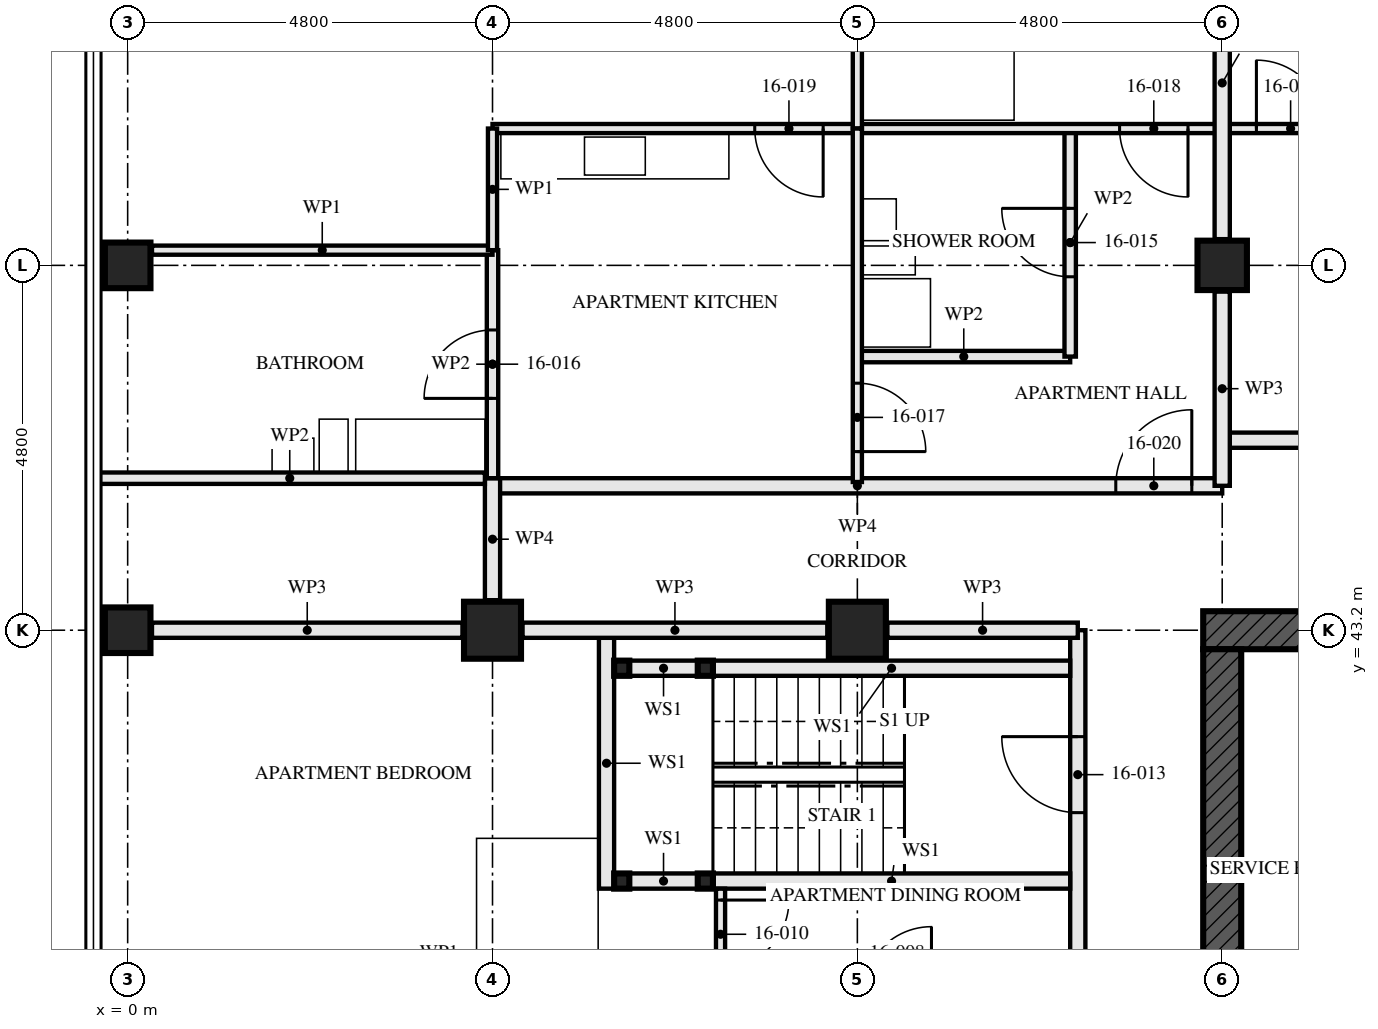
"""IFC4 building model, lengths in metres.
Left out: names, types, materials, properties, quantities, classifications, styles, units other than length and angle.
Written with IfcOpenShell. Run it as: python <this file> out.ifc"""

import sys

from ifc_helpers import new_model, si_unit, direction, frame, frame_2d, origin, origin_2d, place, context, subcontext, project, spatial, rectangle, hollow_rectangle, extrude, element, fill, save


model = new_model("IFC4")
c1 = context("Model", 3, precision=1e-05, world=origin(), true_north=direction((0.0, 1.0)))
c2 = subcontext(c1, "Body", "Model", "MODEL_VIEW")
j1 = project(units=[si_unit("LENGTHUNIT", "METRE"), si_unit("PLANEANGLEUNIT", "RADIAN")], contexts=[c1])
p1 = place(None, origin())
s1 = spatial("IfcSite", under=j1, at=p1, CompositionType="ELEMENT")
p2 = place(p1, origin())
s2 = spatial("IfcBuilding", under=s1, at=p2, CompositionType="ELEMENT")
p3 = place(p2, frame((0.0, 0.0, 62.0)))
s3 = spatial("IfcBuildingStorey", under=s2, at=p3, CompositionType="ELEMENT", Elevation=62.0)
for number, where, z_axis, x_axis in (
    (1, (0.0, 43.2, 0.0), (0.0, 0.0, 1.0), (0.0, 1.0, 0.0)),
    (2, (0.0, 48.0, 0.0), (0.0, 0.0, 1.0), (1.0, 0.0, 0.0)),
):
    element("IfcColumn", number, at=place(p3, frame(where, z_axis=z_axis, x_axis=x_axis)), inside=s3, PredefinedType="COLUMN", context=c2, shape_type="SweptSolid", body=[
        extrude(hollow_rectangle(XDim=0.6, YDim=0.6, WallThickness=0.08, at=origin_2d()), origin(), (0.0, 0.0, 1.0), 3.5),
    ])
for number, where, z_axis, x_axis in (
    (3, (4.8, 43.2, 0.0), (0.0, 0.0, 1.0), (0.0, 1.0, 0.0)),
    (4, (9.6, 43.2, 0.0), (0.0, 0.0, 1.0), (0.0, 1.0, 0.0)),
):
    element("IfcColumn", number, at=place(p3, frame(where, z_axis=z_axis, x_axis=x_axis)), inside=s3, PredefinedType="COLUMN", context=c2, shape_type="SweptSolid", body=[
        extrude(hollow_rectangle(XDim=0.75, YDim=0.75, WallThickness=0.08, at=origin_2d()), origin(), (0.0, 0.0, 1.0), 3.5),
    ])
p4 = place(p3, frame((14.4, 48.0, 0.0), z_axis=(0.0, 0.0, 1.0), x_axis=(1.0, 0.0, 0.0)))
e5 = element("IfcColumn", 5, at=p4, inside=s3, PredefinedType="COLUMN", context=c2, shape_type="SweptSolid", body=[
    extrude(hollow_rectangle(XDim=0.65, YDim=0.65, WallThickness=0.05, at=origin_2d()), origin(), (0.0, 0.0, 1.0), 3.5),
])
p5 = place(p3, frame((29.05, 43.2, -0.17), z_axis=(0.0, 0.0, 1.0), x_axis=(-1.0, 0.0, 0.0)))
e6 = element("IfcWall", 6, at=p5, inside=s3, PredefinedType="SHEAR", context=c2, shape_type="SweptSolid", body=[
    extrude(rectangle(XDim=14.9, YDim=0.5, at=frame_2d((7.45, 0.0))), origin(), (0.0, 0.0, 1.0), 3.5),
])
p6 = place(p5, frame((6.85, 0.0, 0.17)))
e7 = element("IfcOpeningElement", 7, at=p6, cuts=e6, PredefinedType="OPENING", context=c2, shape_type="SweptSolid", body=[
    extrude(rectangle(XDim=1.2, YDim=2.1, at=frame_2d((0.6, 1.05))), frame((0.0, 0.26, 0.0), z_axis=(0.0, -1.0, 0.0), x_axis=(1.0, 0.0, 0.0)), (0.0, 0.0, 1.0), 0.521),
])
p7 = place(p3, frame((14.4, 42.95, -0.17), z_axis=(0.0, 0.0, 1.0), x_axis=(0.0, -1.0, 0.0)))
e8 = element("IfcWall", 8, at=p7, inside=s3, PredefinedType="SHEAR", context=c2, shape_type="SweptSolid", body=[
    extrude(rectangle(XDim=13.9, YDim=0.5, at=frame_2d((6.95, 0.0))), origin(), (0.0, 0.0, 1.0), 3.5),
])
p8 = place(p7, frame((6.35, 0.0, 0.17)))
e9 = element("IfcOpeningElement", 9, at=p8, cuts=e8, PredefinedType="OPENING", context=c2, shape_type="SweptSolid", body=[
    extrude(rectangle(XDim=1.2, YDim=2.1, at=frame_2d((0.6, 1.05))), frame((0.0, 0.26, 0.0), z_axis=(0.0, -1.0, 0.0), x_axis=(1.0, 0.0, 0.0)), (0.0, 0.0, 1.0), 0.521),
])
for number, where, z_axis, x_axis in (
    (10, (6.5, 42.7, 0.0), (0.0, 0.0, 1.0), (1.0, 0.0, 0.0)),
    (11, (6.5, 39.9, 0.0), (0.0, 0.0, 1.0), (1.0, 0.0, 0.0)),
    (12, (7.6, 42.7, 0.0), (0.0, 0.0, 1.0), (1.0, 0.0, 0.0)),
    (13, (7.6, 39.9, 0.0), (0.0, 0.0, 1.0), (1.0, 0.0, 0.0)),
):
    element("IfcColumn", number, at=place(p3, frame(where, z_axis=z_axis, x_axis=x_axis)), inside=s3, PredefinedType="COLUMN", context=c2, shape_type="SweptSolid", body=[
        extrude(hollow_rectangle(XDim=0.2, YDim=0.2, WallThickness=0.008, at=origin_2d()), origin(), (0.0, 0.0, 1.0), 3.33),
    ])
p9 = place(p3, frame((6.6, 42.7, 0.0), z_axis=(0.0, 0.0, 1.0), x_axis=(1.0, 0.0, 0.0)))
e14 = element("IfcWall", 14, at=p9, inside=s3, PredefinedType="SOLIDWALL", context=c2, shape_type="SweptSolid", body=[
    extrude(rectangle(XDim=0.9, YDim=0.2, at=frame_2d((0.45, 0.0))), origin(), (0.0, 0.0, 1.0), 2.99),
])
p10 = place(p3, frame((7.7, 42.7, 0.0), z_axis=(0.0, 0.0, 1.0), x_axis=(1.0, 0.0, 0.0)))
e15 = element("IfcWall", 15, at=p10, inside=s3, PredefinedType="SOLIDWALL", context=c2, shape_type="SweptSolid", body=[
    extrude(rectangle(XDim=4.7, YDim=0.2, at=frame_2d((2.35, 0.0))), origin(), (0.0, 0.0, 1.0), 2.99),
])
p11 = place(p3, frame((6.6, 39.9, 0.0), z_axis=(0.0, 0.0, 1.0), x_axis=(1.0, 0.0, 0.0)))
e16 = element("IfcWall", 16, at=p11, inside=s3, PredefinedType="SOLIDWALL", context=c2, shape_type="SweptSolid", body=[
    extrude(rectangle(XDim=0.9, YDim=0.2, at=frame_2d((0.45, 0.0))), origin(), (0.0, 0.0, 1.0), 2.99),
])
p12 = place(p3, frame((7.7, 39.9, 0.0), z_axis=(0.0, 0.0, 1.0), x_axis=(1.0, 0.0, 0.0)))
e17 = element("IfcWall", 17, at=p12, inside=s3, PredefinedType="SOLIDWALL", context=c2, shape_type="SweptSolid", body=[
    extrude(rectangle(XDim=4.7, YDim=0.2, at=frame_2d((2.35, 0.0))), origin(), (0.0, 0.0, 1.0), 2.99),
])
p13 = place(p3, frame((6.3, 43.1, 0.0), z_axis=(0.0, 0.0, 1.0), x_axis=(0.0, -1.0, 0.0)))
e18 = element("IfcWall", 18, at=p13, inside=s3, PredefinedType="SOLIDWALL", context=c2, shape_type="SweptSolid", body=[
    extrude(rectangle(XDim=3.3, YDim=0.2, at=frame_2d((1.65, 0.0))), origin(), (0.0, 0.0, 1.0), 3.33),
])
p14 = place(p3, frame((7.8, 39.8, 0.0), z_axis=(0.0, 0.0, 1.0), x_axis=(0.0, -1.0, 0.0)))
e19 = element("IfcWall", 19, at=p14, inside=s3, PredefinedType="PARTITIONING", context=c2, shape_type="SweptSolid", body=[
    extrude(rectangle(XDim=1.4, YDim=0.12, at=frame_2d((0.7, 0.0))), origin(), (0.0, 0.0, 1.0), 3.33),
])
p15 = place(p14, frame((0.15, 0.0, 0.0)))
e20 = element("IfcOpeningElement", 20, at=p15, cuts=e19, PredefinedType="OPENING", context=c2, shape_type="SweptSolid", body=[
    extrude(rectangle(XDim=0.9, YDim=2.1, at=frame_2d((0.45, 1.05))), frame((0.0, 0.071, 0.0), z_axis=(0.0, -1.0, 0.0), x_axis=(1.0, 0.0, 0.0)), (0.0, 0.0, 1.0), 0.141),
])
p16 = place(p3, frame((12.5, 43.2, 0.0), z_axis=(0.0, 0.0, 1.0), x_axis=(0.0, -1.0, 0.0)))
e21 = element("IfcWall", 21, at=p16, inside=s3, PredefinedType="PARTITIONING", context=c2, shape_type="SweptSolid", body=[
    extrude(rectangle(XDim=14.4, YDim=0.2, at=frame_2d((7.2, 0.0))), origin(), (0.0, 0.0, 1.0), 2.55),
])
p17 = place(p16, frame((1.4, 0.0, 0.0)))
e22 = element("IfcOpeningElement", 22, at=p17, cuts=e21, PredefinedType="OPENING", context=c2, shape_type="SweptSolid", body=[
    extrude(rectangle(XDim=1.0, YDim=2.1, at=frame_2d((0.5, 1.05))), frame((0.0, 0.111, 0.0), z_axis=(0.0, -1.0, 0.0), x_axis=(1.0, 0.0, 0.0)), (0.0, 0.0, 1.0), 0.221),
])
p18 = place(p16, frame((10.0, 0.0, 0.0)))
e23 = element("IfcOpeningElement", 23, at=p18, cuts=e21, PredefinedType="OPENING", context=c2, shape_type="SweptSolid", body=[
    extrude(rectangle(XDim=1.0, YDim=2.1, at=frame_2d((0.5, 1.05))), frame((0.0, 0.111, 0.0), z_axis=(0.0, -1.0, 0.0), x_axis=(1.0, 0.0, 0.0)), (0.0, 0.0, 1.0), 0.221),
])
p19 = place(p3, frame((12.4, 49.8, 0.0), z_axis=(0.0, 0.0, 1.0), x_axis=(0.0, -1.0, 0.0)))
e24 = element("IfcWall", 24, at=p19, inside=s3, PredefinedType="PARTITIONING", context=c2, shape_type="SweptSolid", body=[
    extrude(rectangle(XDim=3.0, YDim=0.15, at=frame_2d((1.5, 0.0))), origin(), (0.0, 0.0, 1.0), 2.55),
])
p20 = place(p19, frame((1.05, 0.0, 0.0)))
e25 = element("IfcOpeningElement", 25, at=p20, cuts=e24, PredefinedType="OPENING", context=c2, shape_type="SweptSolid", body=[
    extrude(rectangle(XDim=0.9, YDim=2.1, at=frame_2d((0.45, 1.05))), frame((0.0, 0.085, 0.0), z_axis=(0.0, -1.0, 0.0), x_axis=(1.0, 0.0, 0.0)), (0.0, 0.0, 1.0), 0.171),
])
p21 = place(p3, frame((12.4, 46.8, 0.0), z_axis=(0.0, 0.0, 1.0), x_axis=(-1.0, 0.0, 0.0)))
e26 = element("IfcWall", 26, at=p21, inside=s3, PredefinedType="PARTITIONING", context=c2, shape_type="SweptSolid", body=[
    extrude(rectangle(XDim=2.8, YDim=0.15, at=frame_2d((1.4, 0.0))), origin(), (0.0, 0.0, 1.0), 3.33),
])
p22 = place(p3, frame((4.8, 48.2, 0.0), z_axis=(0.0, 0.0, 1.0), x_axis=(0.0, -1.0, 0.0)))
e27 = element("IfcWall", 27, at=p22, inside=s3, PredefinedType="PARTITIONING", context=c2, shape_type="SweptSolid", body=[
    extrude(rectangle(XDim=3.0, YDim=0.15, at=frame_2d((1.5, 0.0))), origin(), (0.0, 0.0, 1.0), 2.55),
])
p23 = place(p22, frame((1.05, 0.0, 0.0)))
e28 = element("IfcOpeningElement", 28, at=p23, cuts=e27, PredefinedType="OPENING", context=c2, shape_type="SweptSolid", body=[
    extrude(rectangle(XDim=0.9, YDim=2.1, at=frame_2d((0.45, 1.05))), frame((0.0, 0.085, 0.0), z_axis=(0.0, -1.0, 0.0), x_axis=(1.0, 0.0, 0.0)), (0.0, 0.0, 1.0), 0.171),
])
p24 = place(p3, frame((9.6, 49.8, 0.0), z_axis=(0.0, 0.0, 1.0), x_axis=(0.0, -1.0, 0.0)))
e29 = element("IfcWall", 29, at=p24, inside=s3, PredefinedType="PARTITIONING", context=c2, shape_type="SweptSolid", body=[
    extrude(rectangle(XDim=4.65, YDim=0.12, at=frame_2d((2.325, 0.0))), origin(), (0.0, 0.0, 1.0), 2.55),
])
p25 = place(p24, frame((3.35, 0.0, 0.0)))
e30 = element("IfcOpeningElement", 30, at=p25, cuts=e29, PredefinedType="OPENING", context=c2, shape_type="SweptSolid", body=[
    extrude(rectangle(XDim=0.9, YDim=2.1, at=frame_2d((0.45, 1.05))), frame((0.0, 0.071, 0.0), z_axis=(0.0, -1.0, 0.0), x_axis=(1.0, 0.0, 0.0)), (0.0, 0.0, 1.0), 0.141),
])
p26 = place(p3, frame((14.4, 49.8, 0.0), z_axis=(0.0, 0.0, 1.0), x_axis=(-1.0, 0.0, 0.0)))
e31 = element("IfcWall", 31, at=p26, inside=s3, PredefinedType="PARTITIONING", context=c2, shape_type="SweptSolid", body=[
    extrude(rectangle(XDim=4.8, YDim=0.12, at=frame_2d((2.4, 0.0))), origin(), (0.0, 0.0, 1.0), 3.33),
])
p27 = place(p26, frame((0.45, 0.0, 0.0)))
e32 = element("IfcOpeningElement", 32, at=p27, cuts=e31, PredefinedType="OPENING", context=c2, shape_type="SweptSolid", body=[
    extrude(rectangle(XDim=0.9, YDim=2.1, at=frame_2d((0.45, 1.05))), frame((0.0, 0.071, 0.0), z_axis=(0.0, -1.0, 0.0), x_axis=(1.0, 0.0, 0.0)), (0.0, 0.0, 1.0), 0.141),
])
p28 = place(p3, frame((9.6, 49.8, 0.0), z_axis=(0.0, 0.0, 1.0), x_axis=(-1.0, 0.0, 0.0)))
e33 = element("IfcWall", 33, at=p28, inside=s3, PredefinedType="PARTITIONING", context=c2, shape_type="SweptSolid", body=[
    extrude(rectangle(XDim=4.8, YDim=0.12, at=frame_2d((2.4, 0.0))), origin(), (0.0, 0.0, 1.0), 3.33),
])
p29 = place(p28, frame((0.45, 0.0, 0.0)))
e34 = element("IfcOpeningElement", 34, at=p29, cuts=e33, PredefinedType="OPENING", context=c2, shape_type="SweptSolid", body=[
    extrude(rectangle(XDim=0.9, YDim=2.1, at=frame_2d((0.45, 1.05))), frame((0.0, 0.071, 0.0), z_axis=(0.0, -1.0, 0.0), x_axis=(1.0, 0.0, 0.0)), (0.0, 0.0, 1.0), 0.141),
])
p30 = place(p3, frame((4.8, 48.2, 0.0), z_axis=(0.0, 0.0, 1.0), x_axis=(-1.0, 0.0, 0.0)))
e35 = element("IfcWall", 35, at=p30, inside=s3, PredefinedType="PARTITIONING", context=c2, shape_type="SweptSolid", body=[
    extrude(rectangle(XDim=4.48, YDim=0.12, at=frame_2d((2.24, 0.0))), origin(), (0.0, 0.0, 1.0), 3.33),
])
p31 = place(p3, frame((9.6, 57.28, 0.0), z_axis=(0.0, 0.0, 1.0), x_axis=(0.0, -1.0, 0.0)))
e36 = element("IfcWall", 36, at=p31, inside=s3, PredefinedType="PARTITIONING", context=c2, shape_type="SweptSolid", body=[
    extrude(rectangle(XDim=7.48, YDim=0.12, at=frame_2d((3.74, 0.0))), origin(), (0.0, 0.0, 1.0), 2.55),
])
p32 = place(p3, frame((4.8, 49.8, 0.0), z_axis=(0.0, 0.0, 1.0), x_axis=(0.0, -1.0, 0.0)))
e37 = element("IfcWall", 37, at=p32, inside=s3, PredefinedType="PARTITIONING", context=c2, shape_type="SweptSolid", body=[
    extrude(rectangle(XDim=1.6, YDim=0.12, at=frame_2d((0.8, 0.0))), origin(), (0.0, 0.0, 1.0), 3.33),
])
p33 = place(p3, frame((14.4, 45.1, 0.0), z_axis=(0.0, 0.0, 1.0), x_axis=(-1.0, 0.0, 0.0)))
e38 = element("IfcWall", 38, at=p33, inside=s3, PredefinedType="PARTITIONING", context=c2, shape_type="SweptSolid", body=[
    extrude(rectangle(XDim=9.6, YDim=0.2, at=frame_2d((4.8, 0.0))), origin(), (0.0, 0.0, 1.0), 3.33),
])
p34 = place(p33, frame((0.4, 0.0, 0.0)))
e39 = element("IfcOpeningElement", 39, at=p34, cuts=e38, PredefinedType="OPENING", context=c2, shape_type="SweptSolid", body=[
    extrude(rectangle(XDim=1.0, YDim=2.1, at=frame_2d((0.5, 1.05))), frame((0.0, 0.111, 0.0), z_axis=(0.0, -1.0, 0.0), x_axis=(1.0, 0.0, 0.0)), (0.0, 0.0, 1.0), 0.221),
])
p35 = place(p3, frame((4.8, 45.2, 0.0), z_axis=(0.0, 0.0, 1.0), x_axis=(0.0, -1.0, 0.0)))
e40 = element("IfcWall", 40, at=p35, inside=s3, PredefinedType="PARTITIONING", context=c2, shape_type="SweptSolid", body=[
    extrude(rectangle(XDim=1.605, YDim=0.2, at=frame_2d((0.802, 0.0))), origin(), (0.0, 0.0, 1.0), 3.33),
])
p36 = place(p3, frame((19.2, 49.8, 0.0), z_axis=(0.0, 0.0, 1.0), x_axis=(-1.0, 0.0, 0.0)))
e41 = element("IfcWall", 41, at=p36, inside=s3, PredefinedType="PARTITIONING", context=c2, shape_type="SweptSolid", body=[
    extrude(rectangle(XDim=4.8, YDim=0.12, at=frame_2d((2.4, 0.0))), origin(), (0.0, 0.0, 1.0), 3.33),
])
p37 = place(p36, frame((3.45, 0.0, 0.0)))
e42 = element("IfcOpeningElement", 42, at=p37, cuts=e41, PredefinedType="OPENING", context=c2, shape_type="SweptSolid", body=[
    extrude(rectangle(XDim=0.9, YDim=2.1, at=frame_2d((0.45, 1.05))), frame((0.0, 0.071, 0.0), z_axis=(0.0, -1.0, 0.0), x_axis=(1.0, 0.0, 0.0)), (0.0, 0.0, 1.0), 0.141),
])
p38 = place(p3, frame((28.8, 45.7, 0.0), z_axis=(0.0, 0.0, 1.0), x_axis=(-1.0, 0.0, 0.0)))
e43 = element("IfcWall", 43, at=p38, inside=s3, PredefinedType="PARTITIONING", context=c2, shape_type="SweptSolid", body=[
    extrude(rectangle(XDim=14.4, YDim=0.2, at=frame_2d((7.2, 0.0))), origin(), (0.0, 0.0, 1.0), 3.33),
])
p39 = place(p38, frame((0.4, 0.0, 0.0)))
e44 = element("IfcOpeningElement", 44, at=p39, cuts=e43, PredefinedType="OPENING", context=c2, shape_type="SweptSolid", body=[
    extrude(rectangle(XDim=1.0, YDim=2.1, at=frame_2d((0.5, 1.05))), frame((0.0, 0.111, 0.0), z_axis=(0.0, -1.0, 0.0), x_axis=(1.0, 0.0, 0.0)), (0.0, 0.0, 1.0), 0.221),
])
p40 = place(p3, frame((12.5, 43.2, 0.0), z_axis=(0.0, 0.0, 1.0), x_axis=(-1.0, 0.0, 0.0)))
e45 = element("IfcWall", 45, at=p40, inside=s3, PredefinedType="PARTITIONING", context=c2, shape_type="SweptSolid", body=[
    extrude(rectangle(XDim=2.505, YDim=0.2, at=frame_2d((1.252, 0.0))), origin(), (0.0, 0.0, 1.0), 2.32),
])
p41 = place(p3, frame((9.205, 43.2, 0.0), z_axis=(0.0, 0.0, 1.0), x_axis=(-1.0, 0.0, 0.0)))
e46 = element("IfcWall", 46, at=p41, inside=s3, PredefinedType="PARTITIONING", context=c2, shape_type="SweptSolid", body=[
    extrude(rectangle(XDim=4.01, YDim=0.2, at=frame_2d((2.005, 0.0))), origin(), (0.0, 0.0, 1.0), 2.32),
])
p42 = place(p3, frame((4.405, 43.2, 0.0), z_axis=(0.0, 0.0, 1.0), x_axis=(-1.0, 0.0, 0.0)))
e47 = element("IfcWall", 47, at=p42, inside=s3, PredefinedType="PARTITIONING", context=c2, shape_type="SweptSolid", body=[
    extrude(rectangle(XDim=4.085, YDim=0.2, at=frame_2d((2.042, 0.0))), origin(), (0.0, 0.0, 1.0), 2.32),
])
p43 = place(p3, frame((14.4, 45.1, 0.0), z_axis=(0.0, 0.0, 1.0), x_axis=(0.0, 1.0, 0.0)))
e48 = element("IfcWall", 48, at=p43, inside=s3, PredefinedType="PARTITIONING", context=c2, shape_type="SweptSolid", body=[
    extrude(rectangle(XDim=2.555, YDim=0.2, at=frame_2d((1.277, 0.0))), origin(), (0.0, 0.0, 1.0), 2.32),
])
p44 = place(p3, frame((14.4, 48.345, 0.0), z_axis=(0.0, 0.0, 1.0), x_axis=(0.0, 1.0, 0.0)))
e49 = element("IfcWall", 49, at=p44, inside=s3, PredefinedType="PARTITIONING", context=c2, shape_type="SweptSolid", body=[
    extrude(rectangle(XDim=4.11, YDim=0.2, at=frame_2d((2.055, 0.0))), origin(), (0.0, 0.0, 1.0), 2.32),
])
p45 = place(p3, frame((4.7, 45.2, 0.0), z_axis=(0.0, 0.0, 1.0), x_axis=(-1.0, 0.0, 0.0)))
e50 = element("IfcWall", 50, at=p45, inside=s3, PredefinedType="PARTITIONING", context=c2, shape_type="SweptSolid", body=[
    extrude(rectangle(XDim=5.135, YDim=0.15, at=frame_2d((2.567, 0.0))), origin(), (0.0, 0.0, 1.0), 2.32),
])
p46 = place(p15, origin())
e51 = element("IfcDoor", 51, at=p46, inside=s3, OperationType="SINGLE_SWING_RIGHT", PredefinedType="DOOR", context=c2, shape_type="SweptSolid", body=[
    extrude(rectangle(XDim=0.9, YDim=2.1, at=frame_2d((0.45, 1.05))), frame((0.0, 0.022, 0.0), z_axis=(0.0, -1.0, 0.0), x_axis=(1.0, 0.0, 0.0)), (0.0, 0.0, 1.0), 0.044),
])
fill(e20, e51)
p47 = place(p17, frame((1.0, 0.0, 0.0), z_axis=(0.0, 0.0, 1.0), x_axis=(-1.0, 0.0, 0.0)))
e52 = element("IfcDoor", 52, at=p47, inside=s3, OperationType="SINGLE_SWING_LEFT", PredefinedType="DOOR", context=c2, shape_type="SweptSolid", body=[
    extrude(rectangle(XDim=1.0, YDim=2.1, at=frame_2d((0.5, 1.05))), frame((0.0, 0.032, 0.0), z_axis=(0.0, -1.0, 0.0), x_axis=(1.0, 0.0, 0.0)), (0.0, 0.0, 1.0), 0.064),
])
fill(e22, e52)
p48 = place(p20, frame((0.9, 0.0, 0.0), z_axis=(0.0, 0.0, 1.0), x_axis=(-1.0, 0.0, 0.0)))
e53 = element("IfcDoor", 53, at=p48, inside=s3, OperationType="SINGLE_SWING_LEFT", PredefinedType="DOOR", context=c2, shape_type="SweptSolid", body=[
    extrude(rectangle(XDim=0.9, YDim=2.1, at=frame_2d((0.45, 1.05))), frame((0.0, 0.022, 0.0), z_axis=(0.0, -1.0, 0.0), x_axis=(1.0, 0.0, 0.0)), (0.0, 0.0, 1.0), 0.044),
])
fill(e25, e53)
p49 = place(p23, frame((0.9, 0.0, 0.0), z_axis=(0.0, 0.0, 1.0), x_axis=(-1.0, 0.0, 0.0)))
e54 = element("IfcDoor", 54, at=p49, inside=s3, OperationType="SINGLE_SWING_RIGHT", PredefinedType="DOOR", context=c2, shape_type="SweptSolid", body=[
    extrude(rectangle(XDim=0.9, YDim=2.1, at=frame_2d((0.45, 1.05))), frame((0.0, 0.022, 0.0), z_axis=(0.0, -1.0, 0.0), x_axis=(1.0, 0.0, 0.0)), (0.0, 0.0, 1.0), 0.044),
])
fill(e28, e54)
p50 = place(p25, origin())
e55 = element("IfcDoor", 55, at=p50, inside=s3, OperationType="SINGLE_SWING_LEFT", PredefinedType="DOOR", context=c2, shape_type="SweptSolid", body=[
    extrude(rectangle(XDim=0.9, YDim=2.1, at=frame_2d((0.45, 1.05))), frame((0.0, 0.022, 0.0), z_axis=(0.0, -1.0, 0.0), x_axis=(1.0, 0.0, 0.0)), (0.0, 0.0, 1.0), 0.044),
])
fill(e30, e55)
p51 = place(p27, origin())
e56 = element("IfcDoor", 56, at=p51, inside=s3, OperationType="SINGLE_SWING_RIGHT", PredefinedType="DOOR", context=c2, shape_type="SweptSolid", body=[
    extrude(rectangle(XDim=0.9, YDim=2.1, at=frame_2d((0.45, 1.05))), frame((0.0, 0.022, 0.0), z_axis=(0.0, -1.0, 0.0), x_axis=(1.0, 0.0, 0.0)), (0.0, 0.0, 1.0), 0.044),
])
fill(e32, e56)
p52 = place(p29, origin())
e57 = element("IfcDoor", 57, at=p52, inside=s3, OperationType="SINGLE_SWING_RIGHT", PredefinedType="DOOR", context=c2, shape_type="SweptSolid", body=[
    extrude(rectangle(XDim=0.9, YDim=2.1, at=frame_2d((0.45, 1.05))), frame((0.0, 0.022, 0.0), z_axis=(0.0, -1.0, 0.0), x_axis=(1.0, 0.0, 0.0)), (0.0, 0.0, 1.0), 0.044),
])
fill(e34, e57)
p53 = place(p34, frame((1.0, 0.0, 0.0), z_axis=(0.0, 0.0, 1.0), x_axis=(-1.0, 0.0, 0.0)))
e58 = element("IfcDoor", 58, at=p53, inside=s3, OperationType="SINGLE_SWING_LEFT", PredefinedType="DOOR", context=c2, shape_type="SweptSolid", body=[
    extrude(rectangle(XDim=1.0, YDim=2.1, at=frame_2d((0.5, 1.05))), frame((0.0, 0.027, 0.0), z_axis=(0.0, -1.0, 0.0), x_axis=(1.0, 0.0, 0.0)), (0.0, 0.0, 1.0), 0.054),
])
fill(e39, e58)
p54 = place(p37, frame((0.9, 0.0, 0.0), z_axis=(0.0, 0.0, 1.0), x_axis=(-1.0, 0.0, 0.0)))
e59 = element("IfcDoor", 59, at=p54, inside=s3, OperationType="SINGLE_SWING_RIGHT", PredefinedType="DOOR", context=c2, shape_type="SweptSolid", body=[
    extrude(rectangle(XDim=0.9, YDim=2.1, at=frame_2d((0.45, 1.05))), frame((0.0, 0.022, 0.0), z_axis=(0.0, -1.0, 0.0), x_axis=(1.0, 0.0, 0.0)), (0.0, 0.0, 1.0), 0.044),
])
fill(e42, e59)
save(model, sys.argv[1])
